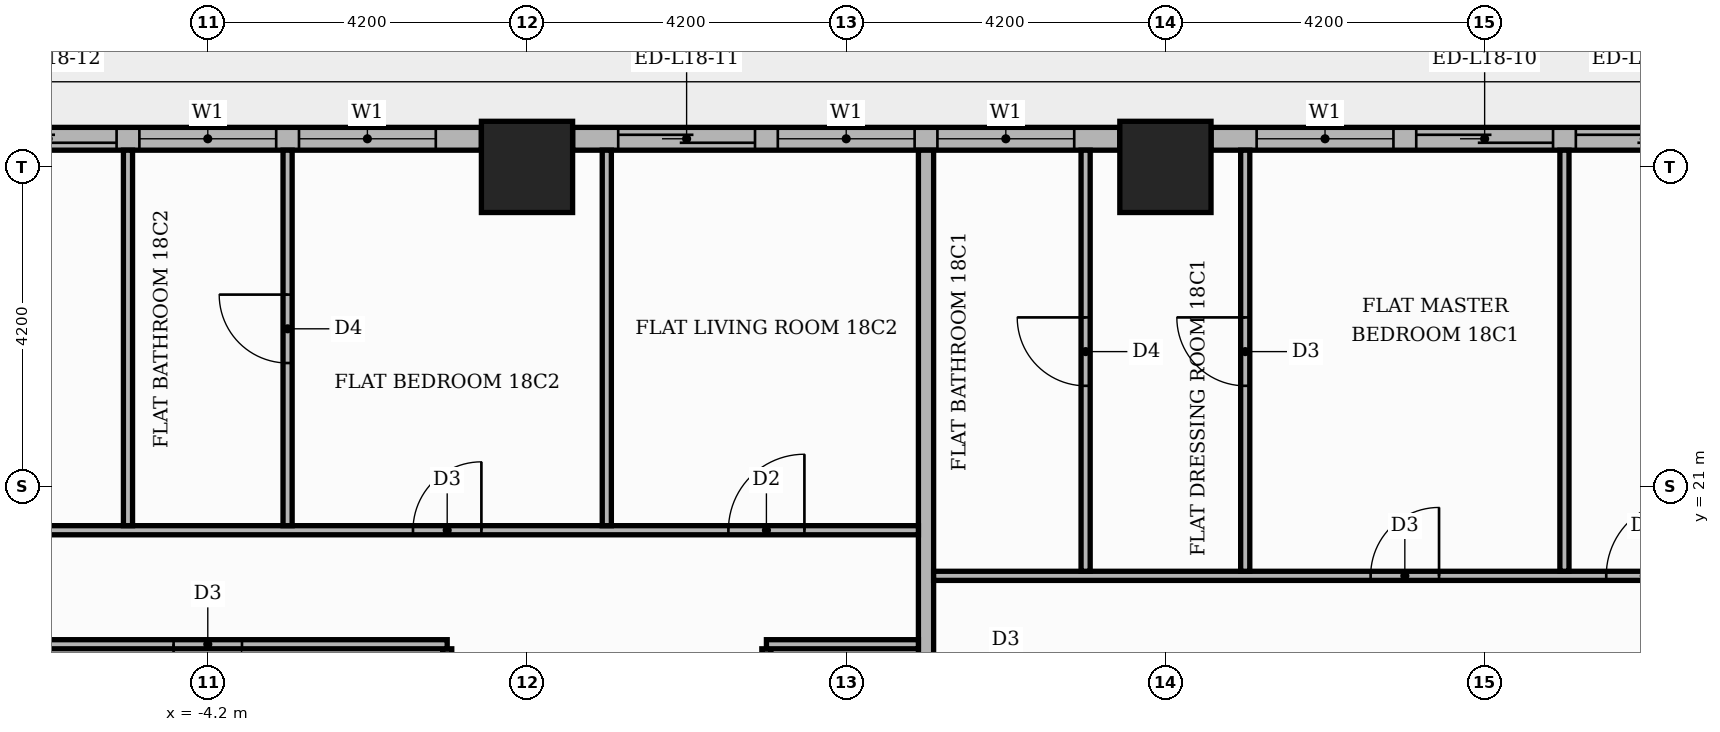
"""IFC4 building model, lengths in metres.
Left out: names, types, materials, properties, quantities, classifications, styles, units other than length and angle.
Written with IfcOpenShell. Run it as: python <this file> out.ifc"""

import sys

from ifc_helpers import new_model, si_unit, direction, frame, frame_2d, origin, origin_2d, place, context, subcontext, project, spatial, rectangle, extrude, element, fill, save


model = new_model("IFC4")
c1 = context("Model", 3, precision=1e-05, world=origin(), true_north=direction((0.0, 1.0)))
c2 = subcontext(c1, "Body", "Model", "MODEL_VIEW")
j1 = project(units=[si_unit("LENGTHUNIT", "METRE"), si_unit("PLANEANGLEUNIT", "RADIAN")], contexts=[c1])
p1 = place(None, origin())
s1 = spatial("IfcSite", under=j1, at=p1, CompositionType="ELEMENT")
p2 = place(p1, origin())
s2 = spatial("IfcBuilding", under=s1, at=p2, CompositionType="ELEMENT")
p3 = place(p2, frame((0.0, 0.0, 79.2)))
s3 = spatial("IfcBuildingStorey", under=s2, at=p3, CompositionType="ELEMENT", Elevation=79.2)
for number, where, z_axis, x_axis in (
    (1, (0.0, 25.2, 0.0), (0.0, 0.0, 1.0), (1.0, 0.0, 0.0)),
    (2, (8.4, 25.2, 0.0), (0.0, 0.0, 1.0), (1.0, 0.0, 0.0)),
):
    element("IfcColumn", number, at=place(p3, frame(where, z_axis=z_axis, x_axis=x_axis)), inside=s3, PredefinedType="COLUMN", context=c2, shape_type="SweptSolid", body=[
        extrude(rectangle(XDim=1.2, YDim=1.2, at=origin_2d()), origin(), (0.0, 0.0, 1.0), 3.9),
    ])
p4 = place(p3, frame((16.2, 25.57, 0.0), z_axis=(0.0, 0.0, 1.0), x_axis=(-1.0, 0.0, 0.0)))
e3 = element("IfcWall", 3, at=p4, inside=s3, PredefinedType="STANDARD", context=c2, shape_type="SweptSolid", body=[
    extrude(rectangle(XDim=7.2, YDim=0.3, at=frame_2d((3.6, 0.0))), origin(), (0.0, 0.0, 1.0), 3.48),
])
p5 = place(p4, frame((0.6, 0.0, 0.0)))
e4 = element("IfcOpeningElement", 4, at=p5, cuts=e3, PredefinedType="OPENING", context=c2, shape_type="SweptSolid", body=[
    extrude(rectangle(XDim=1.8, YDim=2.4, at=frame_2d((0.9, 1.2))), frame((0.0, 0.16, 0.0), z_axis=(0.0, -1.0, 0.0), x_axis=(1.0, 0.0, 0.0)), (0.0, 0.0, 1.0), 0.32),
])
p6 = place(p4, frame((2.7, 0.0, 0.0)))
e5 = element("IfcOpeningElement", 5, at=p6, cuts=e3, PredefinedType="OPENING", context=c2, shape_type="SweptSolid", body=[
    extrude(rectangle(XDim=1.8, YDim=2.4, at=frame_2d((0.9, 1.2))), frame((0.0, 0.16, 0.0), z_axis=(0.0, -1.0, 0.0), x_axis=(1.0, 0.0, 0.0)), (0.0, 0.0, 1.0), 0.32),
])
p7 = place(p4, frame((4.8, 0.0, 0.9)))
e6 = element("IfcOpeningElement", 6, at=p7, cuts=e3, PredefinedType="OPENING", context=c2, shape_type="SweptSolid", body=[
    extrude(rectangle(XDim=1.8, YDim=2.1, at=frame_2d((0.9, 1.05))), frame((0.0, 0.16, 0.0), z_axis=(0.0, -1.0, 0.0), x_axis=(1.0, 0.0, 0.0)), (0.0, 0.0, 1.0), 0.32),
])
p8 = place(p3, frame((7.8, 25.57, 0.0), z_axis=(0.0, 0.0, 1.0), x_axis=(-1.0, 0.0, 0.0)))
e7 = element("IfcWall", 7, at=p8, inside=s3, PredefinedType="STANDARD", context=c2, shape_type="SweptSolid", body=[
    extrude(rectangle(XDim=7.2, YDim=0.3, at=frame_2d((3.6, 0.0))), origin(), (0.0, 0.0, 1.0), 3.48),
])
p9 = place(p8, frame((0.6, 0.0, 0.9)))
e8 = element("IfcOpeningElement", 8, at=p9, cuts=e7, PredefinedType="OPENING", context=c2, shape_type="SweptSolid", body=[
    extrude(rectangle(XDim=1.8, YDim=2.1, at=frame_2d((0.9, 1.05))), frame((0.0, 0.16, 0.0), z_axis=(0.0, -1.0, 0.0), x_axis=(1.0, 0.0, 0.0)), (0.0, 0.0, 1.0), 0.32),
])
p10 = place(p8, frame((2.7, 0.0, 0.9)))
e9 = element("IfcOpeningElement", 9, at=p10, cuts=e7, PredefinedType="OPENING", context=c2, shape_type="SweptSolid", body=[
    extrude(rectangle(XDim=1.8, YDim=2.1, at=frame_2d((0.9, 1.05))), frame((0.0, 0.16, 0.0), z_axis=(0.0, -1.0, 0.0), x_axis=(1.0, 0.0, 0.0)), (0.0, 0.0, 1.0), 0.32),
])
p11 = place(p8, frame((4.8, 0.0, 0.0)))
e10 = element("IfcOpeningElement", 10, at=p11, cuts=e7, PredefinedType="OPENING", context=c2, shape_type="SweptSolid", body=[
    extrude(rectangle(XDim=1.8, YDim=2.4, at=frame_2d((0.9, 1.2))), frame((0.0, 0.16, 0.0), z_axis=(0.0, -1.0, 0.0), x_axis=(1.0, 0.0, 0.0)), (0.0, 0.0, 1.0), 0.32),
])
p12 = place(p3, frame((-0.6, 25.57, 0.0), z_axis=(0.0, 0.0, 1.0), x_axis=(-1.0, 0.0, 0.0)))
e11 = element("IfcWall", 11, at=p12, inside=s3, PredefinedType="STANDARD", context=c2, shape_type="SweptSolid", body=[
    extrude(rectangle(XDim=7.2, YDim=0.3, at=frame_2d((3.6, 0.0))), origin(), (0.0, 0.0, 1.0), 3.48),
])
p13 = place(p12, frame((0.6, 0.0, 0.9)))
e12 = element("IfcOpeningElement", 12, at=p13, cuts=e11, PredefinedType="OPENING", context=c2, shape_type="SweptSolid", body=[
    extrude(rectangle(XDim=1.8, YDim=2.1, at=frame_2d((0.9, 1.05))), frame((0.0, 0.16, 0.0), z_axis=(0.0, -1.0, 0.0), x_axis=(1.0, 0.0, 0.0)), (0.0, 0.0, 1.0), 0.32),
])
p14 = place(p12, frame((2.7, 0.0, 0.9)))
e13 = element("IfcOpeningElement", 13, at=p14, cuts=e11, PredefinedType="OPENING", context=c2, shape_type="SweptSolid", body=[
    extrude(rectangle(XDim=1.8, YDim=2.1, at=frame_2d((0.9, 1.05))), frame((0.0, 0.16, 0.0), z_axis=(0.0, -1.0, 0.0), x_axis=(1.0, 0.0, 0.0)), (0.0, 0.0, 1.0), 0.32),
])
p15 = place(p12, frame((4.8, 0.0, 0.0)))
e14 = element("IfcOpeningElement", 14, at=p15, cuts=e11, PredefinedType="OPENING", context=c2, shape_type="SweptSolid", body=[
    extrude(rectangle(XDim=1.8, YDim=2.4, at=frame_2d((0.9, 1.2))), frame((0.0, 0.16, 0.0), z_axis=(0.0, -1.0, 0.0), x_axis=(1.0, 0.0, 0.0)), (0.0, 0.0, 1.0), 0.32),
])
p16 = place(p3, frame((-1.05, 13.75, 0.0), z_axis=(0.0, 0.0, 1.0), x_axis=(0.0, 1.0, 0.0)))
e15 = element("IfcWall", 15, at=p16, inside=s3, PredefinedType="PARTITIONING", context=c2, shape_type="SweptSolid", body=[
    extrude(rectangle(XDim=5.11, YDim=0.12, at=frame_2d((2.555, 0.0))), origin(), (0.0, 0.0, 1.0), 3.48),
])
p17 = place(p3, frame((3.15, 13.75, 0.0), z_axis=(0.0, 0.0, 1.0), x_axis=(0.0, 1.0, 0.0)))
e16 = element("IfcWall", 16, at=p17, inside=s3, PredefinedType="PARTITIONING", context=c2, shape_type="SweptSolid", body=[
    extrude(rectangle(XDim=5.11, YDim=0.12, at=frame_2d((2.555, 0.0))), origin(), (0.0, 0.0, 1.0), 3.48),
])
p18 = place(p17, frame((2.085, 0.0, 0.0)))
e17 = element("IfcOpeningElement", 17, at=p18, cuts=e16, PredefinedType="OPENING", context=c2, shape_type="SweptSolid", body=[
    extrude(rectangle(XDim=0.9, YDim=2.1, at=frame_2d((0.45, 1.05))), frame((0.0, 0.07, 0.0), z_axis=(0.0, -1.0, 0.0), x_axis=(1.0, 0.0, 0.0)), (0.0, 0.0, 1.0), 0.14),
])
p19 = place(p3, frame((5.25, 13.75, 0.0), z_axis=(0.0, 0.0, 1.0), x_axis=(0.0, 1.0, 0.0)))
e18 = element("IfcWall", 18, at=p19, inside=s3, PredefinedType="PARTITIONING", context=c2, shape_type="SweptSolid", body=[
    extrude(rectangle(XDim=11.67, YDim=0.2, at=frame_2d((5.835, 0.0))), origin(), (0.0, 0.0, 1.0), 3.48),
])
p20 = place(p3, frame((-13.55, 18.92, 0.0), z_axis=(0.0, 0.0, 1.0), x_axis=(1.0, 0.0, 0.0)))
e19 = element("IfcWall", 19, at=p20, inside=s3, PredefinedType="PARTITIONING", context=c2, shape_type="SweptSolid", body=[
    extrude(rectangle(XDim=12.5, YDim=0.12, at=frame_2d((6.25, 0.0))), origin(), (0.0, 0.0, 1.0), 3.48),
])
p21 = place(p20, frame((8.9, 0.0, 0.0)))
e20 = element("IfcOpeningElement", 20, at=p21, cuts=e19, PredefinedType="OPENING", context=c2, shape_type="SweptSolid", body=[
    extrude(rectangle(XDim=0.9, YDim=2.1, at=frame_2d((0.45, 1.05))), frame((0.0, 0.07, 0.0), z_axis=(0.0, -1.0, 0.0), x_axis=(1.0, 0.0, 0.0)), (0.0, 0.0, 1.0), 0.14),
])
p22 = place(p20, frame((4.7, 0.0, 0.0)))
e21 = element("IfcOpeningElement", 21, at=p22, cuts=e19, PredefinedType="OPENING", context=c2, shape_type="SweptSolid", body=[
    extrude(rectangle(XDim=0.9, YDim=2.1, at=frame_2d((0.45, 1.05))), frame((0.0, 0.07, 0.0), z_axis=(0.0, -1.0, 0.0), x_axis=(1.0, 0.0, 0.0)), (0.0, 0.0, 1.0), 0.14),
])
p23 = place(p20, frame((2.6, 0.0, 0.0)))
e22 = element("IfcOpeningElement", 22, at=p23, cuts=e19, PredefinedType="OPENING", context=c2, shape_type="SweptSolid", body=[
    extrude(rectangle(XDim=0.9, YDim=2.1, at=frame_2d((0.45, 1.05))), frame((0.0, 0.07, 0.0), z_axis=(0.0, -1.0, 0.0), x_axis=(1.0, 0.0, 0.0)), (0.0, 0.0, 1.0), 0.14),
])
p24 = place(p20, frame((0.5, 0.0, 0.0)))
e23 = element("IfcOpeningElement", 23, at=p24, cuts=e19, PredefinedType="OPENING", context=c2, shape_type="SweptSolid", body=[
    extrude(rectangle(XDim=0.9, YDim=2.1, at=frame_2d((0.45, 1.05))), frame((0.0, 0.07, 0.0), z_axis=(0.0, -1.0, 0.0), x_axis=(1.0, 0.0, 0.0)), (0.0, 0.0, 1.0), 0.14),
])
p25 = place(p3, frame((3.15, 18.92, 0.0), z_axis=(0.0, 0.0, 1.0), x_axis=(1.0, 0.0, 0.0)))
e24 = element("IfcWall", 24, at=p25, inside=s3, PredefinedType="PARTITIONING", context=c2, shape_type="SweptSolid", body=[
    extrude(rectangle(XDim=2.0, YDim=0.12, at=frame_2d((1.0, 0.0))), origin(), (0.0, 0.0, 1.0), 3.48),
])
p26 = place(p3, frame((5.35, 19.82, 0.0), z_axis=(0.0, 0.0, 1.0), x_axis=(1.0, 0.0, 0.0)))
e25 = element("IfcWall", 25, at=p26, inside=s3, PredefinedType="PARTITIONING", context=c2, shape_type="SweptSolid", body=[
    extrude(rectangle(XDim=12.05, YDim=0.12, at=frame_2d((6.025, 0.0))), origin(), (0.0, 0.0, 1.0), 3.48),
])
p27 = place(p26, frame((8.85, 0.0, 0.0)))
e26 = element("IfcOpeningElement", 26, at=p27, cuts=e25, PredefinedType="OPENING", context=c2, shape_type="SweptSolid", body=[
    extrude(rectangle(XDim=1.0, YDim=2.1, at=frame_2d((0.5, 1.05))), frame((0.0, 0.07, 0.0), z_axis=(0.0, -1.0, 0.0), x_axis=(1.0, 0.0, 0.0)), (0.0, 0.0, 1.0), 0.14),
])
p28 = place(p26, frame((5.75, 0.0, 0.0)))
e27 = element("IfcOpeningElement", 27, at=p28, cuts=e25, PredefinedType="OPENING", context=c2, shape_type="SweptSolid", body=[
    extrude(rectangle(XDim=0.9, YDim=2.1, at=frame_2d((0.45, 1.05))), frame((0.0, 0.07, 0.0), z_axis=(0.0, -1.0, 0.0), x_axis=(1.0, 0.0, 0.0)), (0.0, 0.0, 1.0), 0.14),
])
p29 = place(p3, frame((7.35, 19.88, 0.0), z_axis=(0.0, 0.0, 1.0), x_axis=(0.0, 1.0, 0.0)))
e28 = element("IfcWall", 28, at=p29, inside=s3, PredefinedType="PARTITIONING", context=c2, shape_type="SweptSolid", body=[
    extrude(rectangle(XDim=5.54, YDim=0.12, at=frame_2d((2.77, 0.0))), origin(), (0.0, 0.0, 1.0), 3.48),
])
p30 = place(p29, frame((2.44, 0.0, 0.0)))
e29 = element("IfcOpeningElement", 29, at=p30, cuts=e28, PredefinedType="OPENING", context=c2, shape_type="SweptSolid", body=[
    extrude(rectangle(XDim=0.9, YDim=2.1, at=frame_2d((0.45, 1.05))), frame((0.0, 0.07, 0.0), z_axis=(0.0, -1.0, 0.0), x_axis=(1.0, 0.0, 0.0)), (0.0, 0.0, 1.0), 0.14),
])
p31 = place(p3, frame((9.45, 19.88, 0.0), z_axis=(0.0, 0.0, 1.0), x_axis=(0.0, 1.0, 0.0)))
e30 = element("IfcWall", 30, at=p31, inside=s3, PredefinedType="PARTITIONING", context=c2, shape_type="SweptSolid", body=[
    extrude(rectangle(XDim=5.54, YDim=0.12, at=frame_2d((2.77, 0.0))), origin(), (0.0, 0.0, 1.0), 3.48),
])
p32 = place(p31, frame((2.44, 0.0, 0.0)))
e31 = element("IfcOpeningElement", 31, at=p32, cuts=e30, PredefinedType="OPENING", context=c2, shape_type="SweptSolid", body=[
    extrude(rectangle(XDim=0.9, YDim=2.1, at=frame_2d((0.45, 1.05))), frame((0.0, 0.07, 0.0), z_axis=(0.0, -1.0, 0.0), x_axis=(1.0, 0.0, 0.0)), (0.0, 0.0, 1.0), 0.14),
])
p33 = place(p3, frame((13.65, 19.88, 0.0), z_axis=(0.0, 0.0, 1.0), x_axis=(0.0, 1.0, 0.0)))
e32 = element("IfcWall", 32, at=p33, inside=s3, PredefinedType="PARTITIONING", context=c2, shape_type="SweptSolid", body=[
    extrude(rectangle(XDim=5.54, YDim=0.12, at=frame_2d((2.77, 0.0))), origin(), (0.0, 0.0, 1.0), 3.48),
])
p34 = place(p3, frame((-13.55, 20.42, 0.0), z_axis=(0.0, 0.0, 1.0), x_axis=(1.0, 0.0, 0.0)))
e33 = element("IfcWall", 33, at=p34, inside=s3, PredefinedType="PARTITIONING", context=c2, shape_type="SweptSolid", body=[
    extrude(rectangle(XDim=18.7, YDim=0.12, at=frame_2d((9.35, 0.0))), origin(), (0.0, 0.0, 1.0), 3.48),
])
p35 = place(p34, frame((16.2, 0.0, 0.0)))
e34 = element("IfcOpeningElement", 34, at=p35, cuts=e33, PredefinedType="OPENING", context=c2, shape_type="SweptSolid", body=[
    extrude(rectangle(XDim=1.0, YDim=2.1, at=frame_2d((0.5, 1.05))), frame((0.0, 0.07, 0.0), z_axis=(0.0, -1.0, 0.0), x_axis=(1.0, 0.0, 0.0)), (0.0, 0.0, 1.0), 0.14),
])
p36 = place(p34, frame((12.05, 0.0, 0.0)))
e35 = element("IfcOpeningElement", 35, at=p36, cuts=e33, PredefinedType="OPENING", context=c2, shape_type="SweptSolid", body=[
    extrude(rectangle(XDim=0.9, YDim=2.1, at=frame_2d((0.45, 1.05))), frame((0.0, 0.07, 0.0), z_axis=(0.0, -1.0, 0.0), x_axis=(1.0, 0.0, 0.0)), (0.0, 0.0, 1.0), 0.14),
])
p37 = place(p34, frame((5.75, 0.0, 0.0)))
e36 = element("IfcOpeningElement", 36, at=p37, cuts=e33, PredefinedType="OPENING", context=c2, shape_type="SweptSolid", body=[
    extrude(rectangle(XDim=0.9, YDim=2.1, at=frame_2d((0.45, 1.05))), frame((0.0, 0.07, 0.0), z_axis=(0.0, -1.0, 0.0), x_axis=(1.0, 0.0, 0.0)), (0.0, 0.0, 1.0), 0.14),
])
p38 = place(p3, frame((-5.25, 20.48, 0.0), z_axis=(0.0, 0.0, 1.0), x_axis=(0.0, 1.0, 0.0)))
e37 = element("IfcWall", 37, at=p38, inside=s3, PredefinedType="PARTITIONING", context=c2, shape_type="SweptSolid", body=[
    extrude(rectangle(XDim=4.94, YDim=0.12, at=frame_2d((2.47, 0.0))), origin(), (0.0, 0.0, 1.0), 3.48),
])
p39 = place(p3, frame((-3.15, 20.48, 0.0), z_axis=(0.0, 0.0, 1.0), x_axis=(0.0, 1.0, 0.0)))
e38 = element("IfcWall", 38, at=p39, inside=s3, PredefinedType="PARTITIONING", context=c2, shape_type="SweptSolid", body=[
    extrude(rectangle(XDim=4.94, YDim=0.12, at=frame_2d((2.47, 0.0))), origin(), (0.0, 0.0, 1.0), 3.48),
])
p40 = place(p39, frame((2.14, 0.0, 0.0)))
e39 = element("IfcOpeningElement", 39, at=p40, cuts=e38, PredefinedType="OPENING", context=c2, shape_type="SweptSolid", body=[
    extrude(rectangle(XDim=0.9, YDim=2.1, at=frame_2d((0.45, 1.05))), frame((0.0, 0.07, 0.0), z_axis=(0.0, -1.0, 0.0), x_axis=(1.0, 0.0, 0.0)), (0.0, 0.0, 1.0), 0.14),
])
p41 = place(p3, frame((1.05, 20.48, 0.0), z_axis=(0.0, 0.0, 1.0), x_axis=(0.0, 1.0, 0.0)))
e40 = element("IfcWall", 40, at=p41, inside=s3, PredefinedType="PARTITIONING", context=c2, shape_type="SweptSolid", body=[
    extrude(rectangle(XDim=4.94, YDim=0.12, at=frame_2d((2.47, 0.0))), origin(), (0.0, 0.0, 1.0), 3.48),
])
p42 = place(p5, origin())
e41 = element("IfcDoor", 41, at=p42, inside=s3, OperationType="SLIDING_TO_LEFT", PredefinedType="DOOR", context=c2, shape_type="SweptSolid", body=[
    extrude(rectangle(XDim=1.8, YDim=2.4, at=frame_2d((0.9, 1.2))), frame((0.0, 0.025, 0.0), z_axis=(0.0, -1.0, 0.0), x_axis=(1.0, 0.0, 0.0)), (0.0, 0.0, 1.0), 0.05),
])
fill(e4, e41)
p43 = place(p6, origin())
e42 = element("IfcDoor", 42, at=p43, inside=s3, OperationType="SLIDING_TO_RIGHT", PredefinedType="DOOR", context=c2, shape_type="SweptSolid", body=[
    extrude(rectangle(XDim=1.8, YDim=2.4, at=frame_2d((0.9, 1.2))), frame((0.0, 0.025, 0.0), z_axis=(0.0, -1.0, 0.0), x_axis=(1.0, 0.0, 0.0)), (0.0, 0.0, 1.0), 0.05),
])
fill(e5, e42)
p44 = place(p7, origin())
e43 = element("IfcWindow", 43, at=p44, inside=s3, PartitioningType="SINGLE_PANEL", PredefinedType="WINDOW", context=c2, shape_type="SweptSolid", body=[
    extrude(rectangle(XDim=1.8, YDim=2.1, at=frame_2d((0.9, 1.05))), frame((0.0, 0.03, 0.0), z_axis=(0.0, -1.0, 0.0), x_axis=(1.0, 0.0, 0.0)), (0.0, 0.0, 1.0), 0.06),
])
fill(e6, e43)
p45 = place(p9, origin())
e44 = element("IfcWindow", 44, at=p45, inside=s3, PartitioningType="SINGLE_PANEL", PredefinedType="WINDOW", context=c2, shape_type="SweptSolid", body=[
    extrude(rectangle(XDim=1.8, YDim=2.1, at=frame_2d((0.9, 1.05))), frame((0.0, 0.03, 0.0), z_axis=(0.0, -1.0, 0.0), x_axis=(1.0, 0.0, 0.0)), (0.0, 0.0, 1.0), 0.06),
])
fill(e8, e44)
p46 = place(p10, origin())
e45 = element("IfcWindow", 45, at=p46, inside=s3, PartitioningType="SINGLE_PANEL", PredefinedType="WINDOW", context=c2, shape_type="SweptSolid", body=[
    extrude(rectangle(XDim=1.8, YDim=2.1, at=frame_2d((0.9, 1.05))), frame((0.0, 0.03, 0.0), z_axis=(0.0, -1.0, 0.0), x_axis=(1.0, 0.0, 0.0)), (0.0, 0.0, 1.0), 0.06),
])
fill(e9, e45)
p47 = place(p11, origin())
e46 = element("IfcDoor", 46, at=p47, inside=s3, OperationType="SLIDING_TO_RIGHT", PredefinedType="DOOR", context=c2, shape_type="SweptSolid", body=[
    extrude(rectangle(XDim=1.8, YDim=2.4, at=frame_2d((0.9, 1.2))), frame((0.0, 0.025, 0.0), z_axis=(0.0, -1.0, 0.0), x_axis=(1.0, 0.0, 0.0)), (0.0, 0.0, 1.0), 0.05),
])
fill(e10, e46)
p48 = place(p13, origin())
e47 = element("IfcWindow", 47, at=p48, inside=s3, PartitioningType="SINGLE_PANEL", PredefinedType="WINDOW", context=c2, shape_type="SweptSolid", body=[
    extrude(rectangle(XDim=1.8, YDim=2.1, at=frame_2d((0.9, 1.05))), frame((0.0, 0.03, 0.0), z_axis=(0.0, -1.0, 0.0), x_axis=(1.0, 0.0, 0.0)), (0.0, 0.0, 1.0), 0.06),
])
fill(e12, e47)
p49 = place(p14, origin())
e48 = element("IfcWindow", 48, at=p49, inside=s3, PartitioningType="SINGLE_PANEL", PredefinedType="WINDOW", context=c2, shape_type="SweptSolid", body=[
    extrude(rectangle(XDim=1.8, YDim=2.1, at=frame_2d((0.9, 1.05))), frame((0.0, 0.03, 0.0), z_axis=(0.0, -1.0, 0.0), x_axis=(1.0, 0.0, 0.0)), (0.0, 0.0, 1.0), 0.06),
])
fill(e13, e48)
p50 = place(p15, origin())
e49 = element("IfcDoor", 49, at=p50, inside=s3, OperationType="SLIDING_TO_RIGHT", PredefinedType="DOOR", context=c2, shape_type="SweptSolid", body=[
    extrude(rectangle(XDim=1.8, YDim=2.4, at=frame_2d((0.9, 1.2))), frame((0.0, 0.025, 0.0), z_axis=(0.0, -1.0, 0.0), x_axis=(1.0, 0.0, 0.0)), (0.0, 0.0, 1.0), 0.05),
])
fill(e14, e49)
p51 = place(p27, origin())
e50 = element("IfcDoor", 50, at=p51, inside=s3, OperationType="SINGLE_SWING_RIGHT", PredefinedType="DOOR", context=c2, shape_type="SweptSolid", body=[
    extrude(rectangle(XDim=1.0, YDim=2.1, at=frame_2d((0.5, 1.05))), frame((0.0, 0.025, 0.0), z_axis=(0.0, -1.0, 0.0), x_axis=(1.0, 0.0, 0.0)), (0.0, 0.0, 1.0), 0.05),
])
fill(e26, e50)
p52 = place(p28, origin())
e51 = element("IfcDoor", 51, at=p52, inside=s3, OperationType="SINGLE_SWING_RIGHT", PredefinedType="DOOR", context=c2, shape_type="SweptSolid", body=[
    extrude(rectangle(XDim=0.9, YDim=2.1, at=frame_2d((0.45, 1.05))), frame((0.0, 0.025, 0.0), z_axis=(0.0, -1.0, 0.0), x_axis=(1.0, 0.0, 0.0)), (0.0, 0.0, 1.0), 0.05),
])
fill(e27, e51)
p53 = place(p32, origin())
e52 = element("IfcDoor", 52, at=p53, inside=s3, OperationType="SINGLE_SWING_RIGHT", PredefinedType="DOOR", context=c2, shape_type="SweptSolid", body=[
    extrude(rectangle(XDim=0.9, YDim=2.1, at=frame_2d((0.45, 1.05))), frame((0.0, 0.025, 0.0), z_axis=(0.0, -1.0, 0.0), x_axis=(1.0, 0.0, 0.0)), (0.0, 0.0, 1.0), 0.05),
])
fill(e31, e52)
p54 = place(p30, origin())
e53 = element("IfcDoor", 53, at=p54, inside=s3, OperationType="SINGLE_SWING_RIGHT", PredefinedType="DOOR", context=c2, shape_type="SweptSolid", body=[
    extrude(rectangle(XDim=0.9, YDim=2.1, at=frame_2d((0.45, 1.05))), frame((0.0, 0.025, 0.0), z_axis=(0.0, -1.0, 0.0), x_axis=(1.0, 0.0, 0.0)), (0.0, 0.0, 1.0), 0.05),
])
fill(e29, e53)
p55 = place(p21, frame((0.9, 0.0, 0.0), z_axis=(0.0, 0.0, 1.0), x_axis=(-1.0, 0.0, 0.0)))
e54 = element("IfcDoor", 54, at=p55, inside=s3, OperationType="SINGLE_SWING_LEFT", PredefinedType="DOOR", context=c2, shape_type="SweptSolid", body=[
    extrude(rectangle(XDim=0.9, YDim=2.1, at=frame_2d((0.45, 1.05))), frame((0.0, 0.025, 0.0), z_axis=(0.0, -1.0, 0.0), x_axis=(1.0, 0.0, 0.0)), (0.0, 0.0, 1.0), 0.05),
])
fill(e20, e54)
p56 = place(p35, origin())
e55 = element("IfcDoor", 55, at=p56, inside=s3, OperationType="SINGLE_SWING_RIGHT", PredefinedType="DOOR", context=c2, shape_type="SweptSolid", body=[
    extrude(rectangle(XDim=1.0, YDim=2.1, at=frame_2d((0.5, 1.05))), frame((0.0, 0.025, 0.0), z_axis=(0.0, -1.0, 0.0), x_axis=(1.0, 0.0, 0.0)), (0.0, 0.0, 1.0), 0.05),
])
fill(e34, e55)
p57 = place(p36, origin())
e56 = element("IfcDoor", 56, at=p57, inside=s3, OperationType="SINGLE_SWING_RIGHT", PredefinedType="DOOR", context=c2, shape_type="SweptSolid", body=[
    extrude(rectangle(XDim=0.9, YDim=2.1, at=frame_2d((0.45, 1.05))), frame((0.0, 0.025, 0.0), z_axis=(0.0, -1.0, 0.0), x_axis=(1.0, 0.0, 0.0)), (0.0, 0.0, 1.0), 0.05),
])
fill(e35, e56)
p58 = place(p40, origin())
e57 = element("IfcDoor", 57, at=p58, inside=s3, OperationType="SINGLE_SWING_RIGHT", PredefinedType="DOOR", context=c2, shape_type="SweptSolid", body=[
    extrude(rectangle(XDim=0.9, YDim=2.1, at=frame_2d((0.45, 1.05))), frame((0.0, 0.025, 0.0), z_axis=(0.0, -1.0, 0.0), x_axis=(1.0, 0.0, 0.0)), (0.0, 0.0, 1.0), 0.05),
])
fill(e39, e57)
save(model, sys.argv[1])
